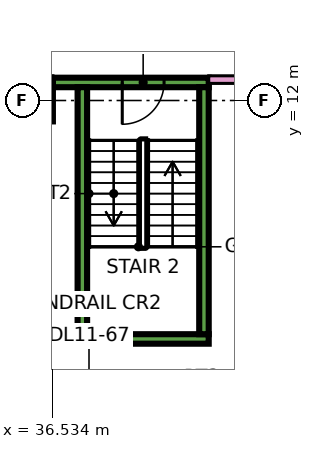
"""IFC4 building model, lengths in metres.
Left out: names, types, materials, properties, quantities, classifications, styles, units other than length and angle.
Written with IfcOpenShell. Run it as: python <this file> out.ifc"""

import sys

from ifc_helpers import new_model, si_unit, direction, frame, frame_2d, origin, origin_2d, place, context, subcontext, project, spatial, rectangle, extrude, element, fill, save


model = new_model("IFC4")
c1 = context("Model", 3, precision=1e-05, world=origin(), true_north=direction((0.0, 1.0)))
c2 = subcontext(c1, "Body", "Model", "MODEL_VIEW")
j1 = project(units=[si_unit("LENGTHUNIT", "METRE"), si_unit("PLANEANGLEUNIT", "RADIAN")], contexts=[c1])
p1 = place(None, origin())
s1 = spatial("IfcSite", under=j1, at=p1, CompositionType="ELEMENT")
p2 = place(p1, origin())
s2 = spatial("IfcBuilding", under=s1, at=p2, CompositionType="ELEMENT")
p3 = place(p2, frame((0.0, 0.0, 56.4)))
s3 = spatial("IfcBuildingStorey", under=s2, at=p3, CompositionType="ELEMENT", Elevation=56.4)
p4 = place(p3, frame((36.0, 12.0, 0.0), z_axis=(0.0, 0.0, 1.0), x_axis=(1.0, 0.0, 0.0)))
e1 = element("IfcColumn", 1, at=p4, inside=s3, PredefinedType="COLUMN", context=c2, shape_type="SweptSolid", body=[
    extrude(rectangle(XDim=1.1, YDim=1.1, at=origin_2d()), origin(), (0.0, 0.0, 1.0), 3.75),
])
p5 = place(p3, frame((37.2, 5.725, 0.0), z_axis=(0.0, 0.0, 1.0), x_axis=(1.0, 0.0, 0.0)))
e2 = element("IfcWall", 2, at=p5, inside=s3, PredefinedType="SHEAR", context=c2, shape_type="SweptSolid", body=[
    extrude(rectangle(XDim=3.45, YDim=0.25, at=frame_2d((1.725, 0.0))), origin(), (0.0, 0.0, 1.0), 3.75),
])
p6 = place(p3, frame((36.55, 12.475, 0.0), z_axis=(0.0, 0.0, 1.0), x_axis=(1.0, 0.0, 0.0)))
e3 = element("IfcWall", 3, at=p6, inside=s3, PredefinedType="SHEAR", context=c2, shape_type="SweptSolid", body=[
    extrude(rectangle(XDim=4.1, YDim=0.25, at=frame_2d((2.05, 0.0))), origin(), (0.0, 0.0, 1.0), 3.75),
])
p7 = place(p6, frame((1.825, 0.0, 0.0)))
e4 = element("IfcOpeningElement", 4, at=p7, cuts=e3, PredefinedType="OPENING", context=c2, shape_type="SweptSolid", body=[
    extrude(rectangle(XDim=1.1, YDim=2.2, at=frame_2d((0.55, 1.1))), frame((0.0, 0.135, 0.0), z_axis=(0.0, -1.0, 0.0), x_axis=(1.0, 0.0, 0.0)), (0.0, 0.0, 1.0), 0.27),
])
for number, where, z_axis, x_axis in (
    (5, (37.325, 5.85, 0.0), (0.0, 0.0, 1.0), (0.0, 1.0, 0.0)),
    (6, (40.525, 5.85, 0.0), (0.0, 0.0, 1.0), (0.0, 1.0, 0.0)),
):
    element("IfcWall", number, at=place(p3, frame(where, z_axis=z_axis, x_axis=x_axis)), inside=s3, PredefinedType="SHEAR", context=c2, shape_type="SweptSolid", body=[
        extrude(rectangle(XDim=6.5, YDim=0.25, at=frame_2d((3.25, 0.0))), origin(), (0.0, 0.0, 1.0), 3.75),
    ])
p8 = place(p3, frame((34.0, 12.55, 0.0), z_axis=(0.0, 0.0, 1.0), x_axis=(1.0, 0.0, 0.0)))
e7 = element("IfcWall", 7, at=p8, inside=s3, PredefinedType="PARTITIONING", context=c2, shape_type="SweptSolid", body=[
    extrude(rectangle(XDim=2.551, YDim=0.2, at=frame_2d((1.275, 0.0))), origin(), (0.0, 0.0, 1.0), 3.35),
])
p9 = place(p3, frame((40.65, 12.55, 0.0), z_axis=(0.0, 0.0, 1.0), x_axis=(1.0, 0.0, 0.0)))
e8 = element("IfcWall", 8, at=p9, inside=s3, PredefinedType="PARTITIONING", context=c2, shape_type="SweptSolid", body=[
    extrude(rectangle(XDim=31.276, YDim=0.2, at=frame_2d((15.638, 0.0))), origin(), (0.0, 0.0, 1.0), 3.35),
])
p10 = place(p9, frame((8.4, 0.0, 0.0)))
e9 = element("IfcOpeningElement", 9, at=p10, cuts=e8, PredefinedType="OPENING", context=c2, shape_type="SweptSolid", body=[
    extrude(rectangle(XDim=1.0, YDim=2.1, at=frame_2d((0.5, 1.05))), frame((0.0, 0.11, 0.0), z_axis=(0.0, -1.0, 0.0), x_axis=(1.0, 0.0, 0.0)), (0.0, 0.0, 1.0), 0.22),
])
p11 = place(p9, frame((29.7, 0.0, 0.0)))
e10 = element("IfcOpeningElement", 10, at=p11, cuts=e8, PredefinedType="OPENING", context=c2, shape_type="SweptSolid", body=[
    extrude(rectangle(XDim=1.0, YDim=2.1, at=frame_2d((0.5, 1.05))), frame((0.0, 0.11, 0.0), z_axis=(0.0, -1.0, 0.0), x_axis=(1.0, 0.0, 0.0)), (0.0, 0.0, 1.0), 0.22),
])
p12 = place(p9, frame((1.05, 0.0, 0.0)))
e11 = element("IfcOpeningElement", 11, at=p12, cuts=e8, PredefinedType="OPENING", context=c2, shape_type="SweptSolid", body=[
    extrude(rectangle(XDim=1.0, YDim=2.1, at=frame_2d((0.5, 1.05))), frame((0.0, 0.11, 0.0), z_axis=(0.0, -1.0, 0.0), x_axis=(1.0, 0.0, 0.0)), (0.0, 0.0, 1.0), 0.22),
])
p13 = place(p7, frame((1.1, 0.0, 0.0), z_axis=(0.0, 0.0, 1.0), x_axis=(-1.0, 0.0, 0.0)))
e12 = element("IfcDoor", 12, at=p13, inside=s3, OperationType="SINGLE_SWING_LEFT", PredefinedType="DOOR", context=c2, shape_type="SweptSolid", body=[
    extrude(rectangle(XDim=1.1, YDim=2.2, at=frame_2d((0.55, 1.1))), frame((0.0, 0.025, 0.0), z_axis=(0.0, -1.0, 0.0), x_axis=(1.0, 0.0, 0.0)), (0.0, 0.0, 1.0), 0.05),
])
fill(e4, e12)
save(model, sys.argv[1])
